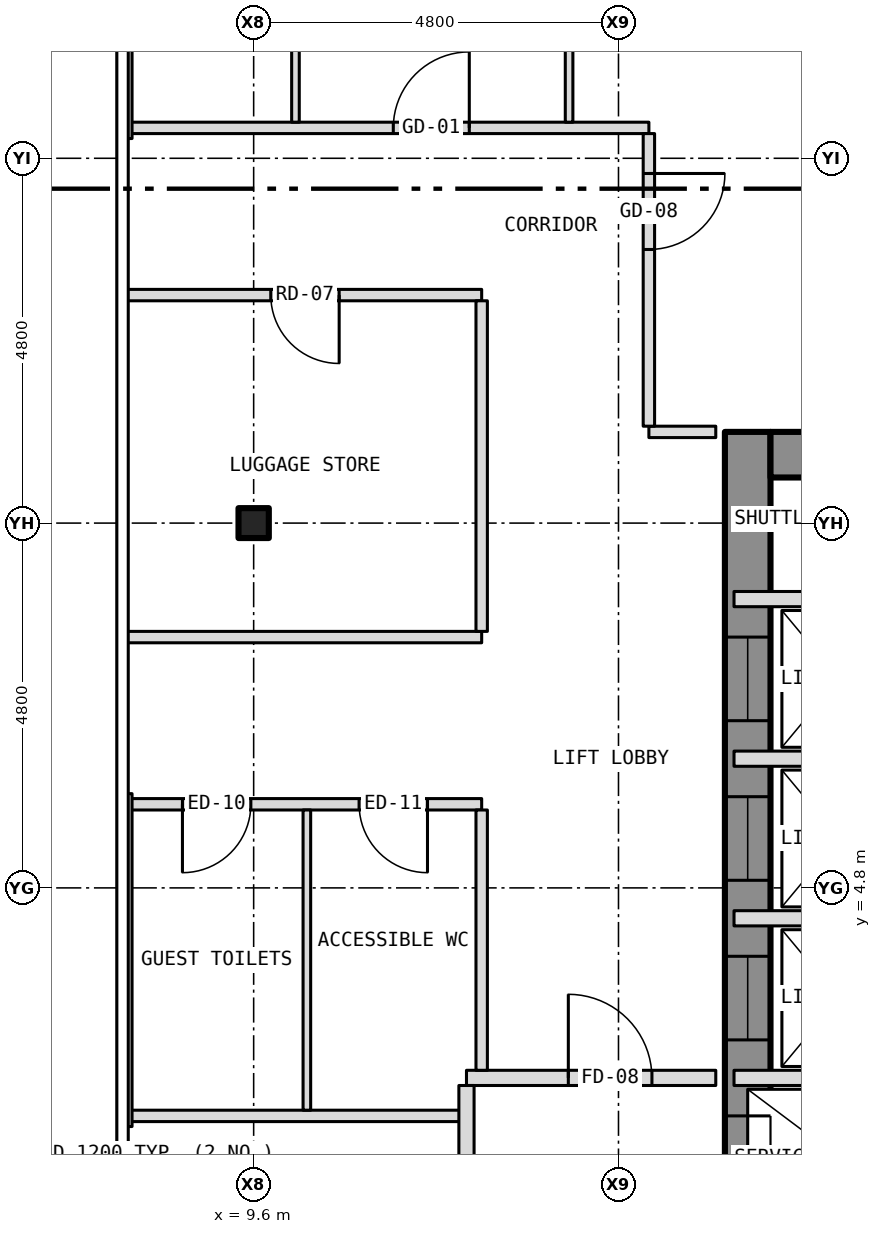
"""IFC4 building model, lengths in metres.
Left out: names, types, materials, properties, quantities, classifications, styles, units other than length and angle.
Written with IfcOpenShell. Run it as: python <this file> out.ifc"""

import sys

from ifc_helpers import new_model, si_unit, direction, frame, frame_2d, origin, origin_2d, place, context, subcontext, project, spatial, rectangle, i_section, extrude, element, fill, save


model = new_model("IFC4")
c1 = context("Model", 3, precision=1e-05, world=origin(), true_north=direction((0.0, 1.0)))
c2 = subcontext(c1, "Body", "Model", "MODEL_VIEW")
j1 = project(units=[si_unit("LENGTHUNIT", "METRE"), si_unit("PLANEANGLEUNIT", "RADIAN")], contexts=[c1])
p1 = place(None, origin())
s1 = spatial("IfcSite", under=j1, at=p1, CompositionType="ELEMENT")
p2 = place(p1, origin())
s2 = spatial("IfcBuilding", under=s1, at=p2, CompositionType="ELEMENT")
p3 = place(p2, frame((0.0, 0.0, 120.5)))
s3 = spatial("IfcBuildingStorey", under=s2, at=p3, CompositionType="ELEMENT", Elevation=120.5)
p4 = place(p3, frame((9.6, 9.6, -0.15), z_axis=(0.0, 0.0, 1.0), x_axis=(1.0, 0.0, 0.0)))
e1 = element("IfcColumn", 1, at=p4, inside=s3, PredefinedType="COLUMN", context=c2, shape_type="SweptSolid", body=[
    extrude(i_section(OverallWidth=0.399, OverallDepth=0.394, WebThickness=0.023, FlangeThickness=0.037, at=origin_2d()), origin(), (0.0, 0.0, 1.0), 3.5),
])
p5 = place(p3, frame((16.1, -10.8, 0.0), z_axis=(0.0, 0.0, 1.0), x_axis=(0.0, 1.0, 0.0)))
e2 = element("IfcWall", 2, at=p5, inside=s3, PredefinedType="SHEAR", context=c2, shape_type="SweptSolid", body=[
    extrude(rectangle(XDim=21.6, YDim=0.6, at=frame_2d((10.8, 0.0))), origin(), (0.0, 0.0, 1.0), 3.25),
])
p6 = place(p5, frame((9.4, 0.0, 0.0)))
e3 = element("IfcOpeningElement", 3, at=p6, cuts=e2, PredefinedType="OPENING", context=c2, shape_type="SweptSolid", body=[
    extrude(rectangle(XDim=1.1, YDim=2.1, at=frame_2d((0.55, 1.05))), frame((0.0, 0.312, 0.0), z_axis=(0.0, -1.0, 0.0), x_axis=(1.0, 0.0, 0.0)), (0.0, 0.0, 1.0), 0.624),
])
p7 = place(p5, frame((11.5, 0.0, 0.0)))
e4 = element("IfcOpeningElement", 4, at=p7, cuts=e2, PredefinedType="OPENING", context=c2, shape_type="SweptSolid", body=[
    extrude(rectangle(XDim=1.1, YDim=2.1, at=frame_2d((0.55, 1.05))), frame((0.0, 0.312, 0.0), z_axis=(0.0, -1.0, 0.0), x_axis=(1.0, 0.0, 0.0)), (0.0, 0.0, 1.0), 0.624),
])
p8 = place(p5, frame((13.6, 0.0, 0.0)))
e5 = element("IfcOpeningElement", 5, at=p8, cuts=e2, PredefinedType="OPENING", context=c2, shape_type="SweptSolid", body=[
    extrude(rectangle(XDim=1.1, YDim=2.1, at=frame_2d((0.55, 1.05))), frame((0.0, 0.312, 0.0), z_axis=(0.0, -1.0, 0.0), x_axis=(1.0, 0.0, 0.0)), (0.0, 0.0, 1.0), 0.624),
])
p9 = place(p5, frame((15.7, 0.0, 0.0)))
e6 = element("IfcOpeningElement", 6, at=p9, cuts=e2, PredefinedType="OPENING", context=c2, shape_type="SweptSolid", body=[
    extrude(rectangle(XDim=1.1, YDim=2.1, at=frame_2d((0.55, 1.05))), frame((0.0, 0.312, 0.0), z_axis=(0.0, -1.0, 0.0), x_axis=(1.0, 0.0, 0.0)), (0.0, 0.0, 1.0), 0.624),
])
p10 = place(p5, frame((17.8, 0.0, 0.0)))
e7 = element("IfcOpeningElement", 7, at=p10, cuts=e2, PredefinedType="OPENING", context=c2, shape_type="SweptSolid", body=[
    extrude(rectangle(XDim=1.1, YDim=2.1, at=frame_2d((0.55, 1.05))), frame((0.0, 0.312, 0.0), z_axis=(0.0, -1.0, 0.0), x_axis=(1.0, 0.0, 0.0)), (0.0, 0.0, 1.0), 0.624),
])
p11 = place(p5, frame((5.642, 0.0, 0.0)))
e8 = element("IfcOpeningElement", 8, at=p11, cuts=e2, PredefinedType="OPENING", context=c2, shape_type="SweptSolid", body=[
    extrude(rectangle(XDim=1.1, YDim=2.1, at=frame_2d((0.55, 1.05))), frame((0.0, 0.312, 0.0), z_axis=(0.0, -1.0, 0.0), x_axis=(1.0, 0.0, 0.0)), (0.0, 0.0, 1.0), 0.624),
])
p12 = place(p5, frame((7.5, 0.0, 0.0)))
e9 = element("IfcOpeningElement", 9, at=p12, cuts=e2, PredefinedType="OPENING", context=c2, shape_type="SweptSolid", body=[
    extrude(rectangle(XDim=1.1, YDim=2.1, at=frame_2d((0.55, 1.05))), frame((0.0, 0.312, 0.0), z_axis=(0.0, -1.0, 0.0), x_axis=(1.0, 0.0, 0.0)), (0.0, 0.0, 1.0), 0.624),
])
p13 = place(p3, frame((16.4, 10.5, 0.0), z_axis=(0.0, 0.0, 1.0), x_axis=(1.0, 0.0, 0.0)))
e10 = element("IfcWall", 10, at=p13, inside=s3, PredefinedType="SHEAR", context=c2, shape_type="SweptSolid", body=[
    extrude(rectangle(XDim=5.8, YDim=0.6, at=frame_2d((2.9, 0.0))), origin(), (0.0, 0.0, 1.0), 3.25),
])
p14 = place(p3, frame((7.875, -1.4, 0.0), z_axis=(0.0, 0.0, 1.0), x_axis=(0.0, 1.0, 0.0)))
e11 = element("IfcWall", 11, at=p14, inside=s3, PredefinedType="SOLIDWALL", context=c2, shape_type="SweptSolid", body=[
    extrude(rectangle(XDim=2.8, YDim=0.2, at=frame_2d((1.4, 0.0))), origin(), (0.0, 0.0, 1.0), 3.5),
])
p15 = place(p14, frame((0.5, 0.0, 0.0)))
e12 = element("IfcOpeningElement", 12, at=p15, cuts=e11, PredefinedType="OPENING", context=c2, shape_type="SweptSolid", body=[
    extrude(rectangle(XDim=1.8, YDim=2.1, at=frame_2d((0.9, 1.05))), frame((0.0, 0.112, 0.0), z_axis=(0.0, -1.0, 0.0), x_axis=(1.0, 0.0, 0.0)), (0.0, 0.0, 1.0), 0.224),
])
p16 = place(p3, frame((7.95, 1.8, 0.0), z_axis=(0.0, 0.0, 1.0), x_axis=(1.0, 0.0, 0.0)))
e13 = element("IfcWall", 13, at=p16, inside=s3, PredefinedType="PARTITIONING", context=c2, shape_type="SweptSolid", body=[
    extrude(rectangle(XDim=4.45, YDim=0.15, at=frame_2d((2.225, 0.0))), origin(), (0.0, 0.0, 1.0), 3.35),
])
p17 = place(p3, frame((12.4, 2.3, 0.0), z_axis=(0.0, 0.0, 1.0), x_axis=(1.0, 0.0, 0.0)))
e14 = element("IfcWall", 14, at=p17, inside=s3, PredefinedType="PARTITIONING", context=c2, shape_type="SweptSolid", body=[
    extrude(rectangle(XDim=3.28, YDim=0.2, at=frame_2d((1.64, 0.0))), origin(), (0.0, 0.0, 1.0), 3.35),
])
p18 = place(p17, frame((1.34, 0.0, 0.0)))
e15 = element("IfcOpeningElement", 15, at=p18, cuts=e14, PredefinedType="OPENING", context=c2, shape_type="SweptSolid", body=[
    extrude(rectangle(XDim=1.1, YDim=2.1, at=frame_2d((0.55, 1.05))), frame((0.0, 0.112, 0.0), z_axis=(0.0, -1.0, 0.0), x_axis=(1.0, 0.0, 0.0)), (0.0, 0.0, 1.0), 0.224),
])
for number, where, z_axis, x_axis in (
    (16, (15.92, 2.3, 0.0), (0.0, 0.0, 1.0), (1.0, 0.0, 0.0)),
    (17, (15.92, 4.4, 0.0), (0.0, 0.0, 1.0), (1.0, 0.0, 0.0)),
):
    element("IfcWall", number, at=place(p3, frame(where, z_axis=z_axis, x_axis=x_axis)), inside=s3, PredefinedType="PARTITIONING", context=c2, shape_type="SweptSolid", body=[
        extrude(rectangle(XDim=2.88, YDim=0.2, at=frame_2d((1.44, 0.0))), origin(), (0.0, 0.0, 1.0), 3.25),
    ])
p19 = place(p3, frame((7.95, 5.9, 0.0), z_axis=(0.0, 0.0, 1.0), x_axis=(1.0, 0.0, 0.0)))
e18 = element("IfcWall", 18, at=p19, inside=s3, PredefinedType="PARTITIONING", context=c2, shape_type="SweptSolid", body=[
    extrude(rectangle(XDim=4.65, YDim=0.15, at=frame_2d((2.325, 0.0))), origin(), (0.0, 0.0, 1.0), 3.35),
])
p20 = place(p19, frame((0.713, 0.0, 0.0)))
e19 = element("IfcOpeningElement", 19, at=p20, cuts=e18, PredefinedType="OPENING", context=c2, shape_type="SweptSolid", body=[
    extrude(rectangle(XDim=0.9, YDim=2.1, at=frame_2d((0.45, 1.05))), frame((0.0, 0.087, 0.0), z_axis=(0.0, -1.0, 0.0), x_axis=(1.0, 0.0, 0.0)), (0.0, 0.0, 1.0), 0.174),
])
p21 = place(p19, frame((3.037, 0.0, 0.0)))
e20 = element("IfcOpeningElement", 20, at=p21, cuts=e18, PredefinedType="OPENING", context=c2, shape_type="SweptSolid", body=[
    extrude(rectangle(XDim=0.9, YDim=2.1, at=frame_2d((0.45, 1.05))), frame((0.0, 0.087, 0.0), z_axis=(0.0, -1.0, 0.0), x_axis=(1.0, 0.0, 0.0)), (0.0, 0.0, 1.0), 0.174),
])
p22 = place(p3, frame((15.92, 6.5, 0.0), z_axis=(0.0, 0.0, 1.0), x_axis=(1.0, 0.0, 0.0)))
e21 = element("IfcWall", 21, at=p22, inside=s3, PredefinedType="PARTITIONING", context=c2, shape_type="SweptSolid", body=[
    extrude(rectangle(XDim=2.88, YDim=0.2, at=frame_2d((1.44, 0.0))), origin(), (0.0, 0.0, 1.0), 3.25),
])
p23 = place(p3, frame((7.92, 8.1, 0.0), z_axis=(0.0, 0.0, 1.0), x_axis=(1.0, 0.0, 0.0)))
e22 = element("IfcWall", 22, at=p23, inside=s3, PredefinedType="PARTITIONING", context=c2, shape_type="SweptSolid", body=[
    extrude(rectangle(XDim=4.68, YDim=0.15, at=frame_2d((2.34, 0.0))), origin(), (0.0, 0.0, 1.0), 3.35),
])
p24 = place(p3, frame((15.92, 8.6, 0.0), z_axis=(0.0, 0.0, 1.0), x_axis=(1.0, 0.0, 0.0)))
e23 = element("IfcWall", 23, at=p24, inside=s3, PredefinedType="PARTITIONING", context=c2, shape_type="SweptSolid", body=[
    extrude(rectangle(XDim=2.88, YDim=0.2, at=frame_2d((1.44, 0.0))), origin(), (0.0, 0.0, 1.0), 3.25),
])
p25 = place(p3, frame((14.8, 10.8, 0.0), z_axis=(0.0, 0.0, 1.0), x_axis=(1.0, 0.0, 0.0)))
e24 = element("IfcWall", 24, at=p25, inside=s3, PredefinedType="PARTITIONING", context=c2, shape_type="SweptSolid", body=[
    extrude(rectangle(XDim=0.88, YDim=0.15, at=frame_2d((0.44, 0.0))), origin(), (0.0, 0.0, 1.0), 3.35),
])
p26 = place(p3, frame((7.92, 12.6, 0.0), z_axis=(0.0, 0.0, 1.0), x_axis=(1.0, 0.0, 0.0)))
e25 = element("IfcWall", 25, at=p26, inside=s3, PredefinedType="PARTITIONING", context=c2, shape_type="SweptSolid", body=[
    extrude(rectangle(XDim=4.68, YDim=0.15, at=frame_2d((2.34, 0.0))), origin(), (0.0, 0.0, 1.0), 3.35),
])
p27 = place(p26, frame((1.905, 0.0, 0.0)))
e26 = element("IfcOpeningElement", 26, at=p27, cuts=e25, PredefinedType="OPENING", context=c2, shape_type="SweptSolid", body=[
    extrude(rectangle(XDim=0.9, YDim=2.1, at=frame_2d((0.45, 1.05))), frame((0.0, 0.087, 0.0), z_axis=(0.0, -1.0, 0.0), x_axis=(1.0, 0.0, 0.0)), (0.0, 0.0, 1.0), 0.174),
])
p28 = place(p3, frame((7.95, 14.8, 0.0), z_axis=(0.0, 0.0, 1.0), x_axis=(1.0, 0.0, 0.0)))
e27 = element("IfcWall", 27, at=p28, inside=s3, PredefinedType="PARTITIONING", context=c2, shape_type="SweptSolid", body=[
    extrude(rectangle(XDim=6.85, YDim=0.15, at=frame_2d((3.425, 0.0))), origin(), (0.0, 0.0, 1.0), 3.35),
])
p29 = place(p28, frame((3.487, 0.0, 0.0)))
e28 = element("IfcOpeningElement", 28, at=p29, cuts=e27, PredefinedType="OPENING", context=c2, shape_type="SweptSolid", body=[
    extrude(rectangle(XDim=1.0, YDim=2.1, at=frame_2d((0.5, 1.05))), frame((0.0, 0.087, 0.0), z_axis=(0.0, -1.0, 0.0), x_axis=(1.0, 0.0, 0.0)), (0.0, 0.0, 1.0), 0.174),
])
p30 = place(p3, frame((7.95, 1.66, 0.0), z_axis=(0.0, 0.0, 1.0), x_axis=(0.0, 1.0, 0.0)))
e29 = element("IfcWall", 29, at=p30, inside=s3, PredefinedType="PARTITIONING", context=c2, shape_type="SweptSolid", body=[
    extrude(rectangle(XDim=4.38, YDim=0.1, at=frame_2d((2.19, 0.0))), origin(), (0.0, 0.0, 1.0), 2.733),
])
p31 = place(p3, frame((7.95, 14.66, 0.0), z_axis=(0.0, 0.0, 1.0), x_axis=(0.0, 1.0, 0.0)))
e30 = element("IfcWall", 30, at=p31, inside=s3, PredefinedType="PARTITIONING", context=c2, shape_type="SweptSolid", body=[
    extrude(rectangle(XDim=3.48, YDim=0.1, at=frame_2d((1.74, 0.0))), origin(), (0.0, 0.0, 1.0), 2.733),
])
p32 = place(p3, frame((10.15, 14.875, 0.0), z_axis=(0.0, 0.0, 1.0), x_axis=(0.0, 1.0, 0.0)))
e31 = element("IfcWall", 31, at=p32, inside=s3, PredefinedType="PARTITIONING", context=c2, shape_type="SweptSolid", body=[
    extrude(rectangle(XDim=3.075, YDim=0.1, at=frame_2d((1.538, 0.0))), origin(), (0.0, 0.0, 1.0), 3.35),
])
p33 = place(p32, frame((1.971, 0.0, 0.0)))
e32 = element("IfcOpeningElement", 32, at=p33, cuts=e31, PredefinedType="OPENING", context=c2, shape_type="SweptSolid", body=[
    extrude(rectangle(XDim=0.9, YDim=2.1, at=frame_2d((0.45, 1.05))), frame((0.0, 0.062, 0.0), z_axis=(0.0, -1.0, 0.0), x_axis=(1.0, 0.0, 0.0)), (0.0, 0.0, 1.0), 0.124),
])
p34 = place(p3, frame((10.3, 1.875, 0.0), z_axis=(0.0, 0.0, 1.0), x_axis=(0.0, 1.0, 0.0)))
e33 = element("IfcWall", 33, at=p34, inside=s3, PredefinedType="PARTITIONING", context=c2, shape_type="SweptSolid", body=[
    extrude(rectangle(XDim=3.95, YDim=0.1, at=frame_2d((1.975, 0.0))), origin(), (0.0, 0.0, 1.0), 3.35),
])
p35 = place(p3, frame((12.4, -1.8, 0.0), z_axis=(0.0, 0.0, 1.0), x_axis=(0.0, 1.0, 0.0)))
e34 = element("IfcWall", 34, at=p35, inside=s3, PredefinedType="PARTITIONING", context=c2, shape_type="SweptSolid", body=[
    extrude(rectangle(XDim=4.0, YDim=0.2, at=frame_2d((2.0, 0.0))), origin(), (0.0, 0.0, 1.0), 3.35),
])
p36 = place(p35, frame((1.25, 0.0, 0.0)))
e35 = element("IfcOpeningElement", 35, at=p36, cuts=e34, PredefinedType="OPENING", context=c2, shape_type="SweptSolid", body=[
    extrude(rectangle(XDim=1.1, YDim=2.1, at=frame_2d((0.55, 1.05))), frame((0.0, 0.112, 0.0), z_axis=(0.0, -1.0, 0.0), x_axis=(1.0, 0.0, 0.0)), (0.0, 0.0, 1.0), 0.224),
])
p37 = place(p3, frame((12.6, 2.4, 0.0), z_axis=(0.0, 0.0, 1.0), x_axis=(0.0, 1.0, 0.0)))
e36 = element("IfcWall", 36, at=p37, inside=s3, PredefinedType="PARTITIONING", context=c2, shape_type="SweptSolid", body=[
    extrude(rectangle(XDim=3.425, YDim=0.15, at=frame_2d((1.712, 0.0))), origin(), (0.0, 0.0, 1.0), 3.35),
])
p38 = place(p3, frame((12.6, 8.175, 0.0), z_axis=(0.0, 0.0, 1.0), x_axis=(0.0, 1.0, 0.0)))
e37 = element("IfcWall", 37, at=p38, inside=s3, PredefinedType="PARTITIONING", context=c2, shape_type="SweptSolid", body=[
    extrude(rectangle(XDim=4.35, YDim=0.15, at=frame_2d((2.175, 0.0))), origin(), (0.0, 0.0, 1.0), 3.35),
])
p39 = place(p3, frame((13.75, 14.875, 0.0), z_axis=(0.0, 0.0, 1.0), x_axis=(0.0, 1.0, 0.0)))
e38 = element("IfcWall", 38, at=p39, inside=s3, PredefinedType="PARTITIONING", context=c2, shape_type="SweptSolid", body=[
    extrude(rectangle(XDim=7.805, YDim=0.1, at=frame_2d((3.902, 0.0))), origin(), (0.0, 0.0, 1.0), 3.35),
])
p40 = place(p3, frame((14.8, 10.875, 0.0), z_axis=(0.0, 0.0, 1.0), x_axis=(0.0, 1.0, 0.0)))
e39 = element("IfcWall", 39, at=p40, inside=s3, PredefinedType="PARTITIONING", context=c2, shape_type="SweptSolid", body=[
    extrude(rectangle(XDim=3.85, YDim=0.15, at=frame_2d((1.925, 0.0))), origin(), (0.0, 0.0, 1.0), 3.35),
])
p41 = place(p40, frame((2.325, 0.0, 0.0)))
e40 = element("IfcOpeningElement", 40, at=p41, cuts=e39, PredefinedType="OPENING", context=c2, shape_type="SweptSolid", body=[
    extrude(rectangle(XDim=1.0, YDim=2.1, at=frame_2d((0.5, 1.05))), frame((0.0, 0.087, 0.0), z_axis=(0.0, -1.0, 0.0), x_axis=(1.0, 0.0, 0.0)), (0.0, 0.0, 1.0), 0.174),
])
p42 = place(p7, origin())
e41 = element("IfcDoor", 41, at=p42, inside=s3, OperationType="SLIDING_TO_LEFT", PredefinedType="DOOR", context=c2, shape_type="SweptSolid", body=[
    extrude(rectangle(XDim=1.1, YDim=2.1, at=frame_2d((0.55, 1.05))), frame((0.0, 0.025, 0.0), z_axis=(0.0, -1.0, 0.0), x_axis=(1.0, 0.0, 0.0)), (0.0, 0.0, 1.0), 0.05),
])
fill(e4, e41)
p43 = place(p8, origin())
e42 = element("IfcDoor", 42, at=p43, inside=s3, OperationType="SLIDING_TO_LEFT", PredefinedType="DOOR", context=c2, shape_type="SweptSolid", body=[
    extrude(rectangle(XDim=1.1, YDim=2.1, at=frame_2d((0.55, 1.05))), frame((0.0, 0.025, 0.0), z_axis=(0.0, -1.0, 0.0), x_axis=(1.0, 0.0, 0.0)), (0.0, 0.0, 1.0), 0.05),
])
fill(e5, e42)
p44 = place(p9, origin())
e43 = element("IfcDoor", 43, at=p44, inside=s3, OperationType="SLIDING_TO_LEFT", PredefinedType="DOOR", context=c2, shape_type="SweptSolid", body=[
    extrude(rectangle(XDim=1.1, YDim=2.1, at=frame_2d((0.55, 1.05))), frame((0.0, 0.025, 0.0), z_axis=(0.0, -1.0, 0.0), x_axis=(1.0, 0.0, 0.0)), (0.0, 0.0, 1.0), 0.05),
])
fill(e6, e43)
p45 = place(p10, origin())
e44 = element("IfcDoor", 44, at=p45, inside=s3, OperationType="SLIDING_TO_LEFT", PredefinedType="DOOR", context=c2, shape_type="SweptSolid", body=[
    extrude(rectangle(XDim=1.1, YDim=2.1, at=frame_2d((0.55, 1.05))), frame((0.0, 0.025, 0.0), z_axis=(0.0, -1.0, 0.0), x_axis=(1.0, 0.0, 0.0)), (0.0, 0.0, 1.0), 0.05),
])
fill(e7, e44)
p46 = place(p18, origin())
e45 = element("IfcDoor", 45, at=p46, inside=s3, OperationType="SINGLE_SWING_LEFT", PredefinedType="DOOR", context=c2, shape_type="SweptSolid", body=[
    extrude(rectangle(XDim=1.1, YDim=2.1, at=frame_2d((0.55, 1.05))), frame((0.0, 0.025, 0.0), z_axis=(0.0, -1.0, 0.0), x_axis=(1.0, 0.0, 0.0)), (0.0, 0.0, 1.0), 0.05),
])
fill(e15, e45)
p47 = place(p29, origin())
e46 = element("IfcDoor", 46, at=p47, inside=s3, OperationType="SINGLE_SWING_RIGHT", PredefinedType="DOOR", context=c2, shape_type="SweptSolid", body=[
    extrude(rectangle(XDim=1.0, YDim=2.1, at=frame_2d((0.5, 1.05))), frame((0.0, 0.025, 0.0), z_axis=(0.0, -1.0, 0.0), x_axis=(1.0, 0.0, 0.0)), (0.0, 0.0, 1.0), 0.05),
])
fill(e28, e46)
p48 = place(p41, origin())
e47 = element("IfcDoor", 47, at=p48, inside=s3, OperationType="SINGLE_SWING_RIGHT", PredefinedType="DOOR", context=c2, shape_type="SweptSolid", body=[
    extrude(rectangle(XDim=1.0, YDim=2.1, at=frame_2d((0.5, 1.05))), frame((0.0, 0.025, 0.0), z_axis=(0.0, -1.0, 0.0), x_axis=(1.0, 0.0, 0.0)), (0.0, 0.0, 1.0), 0.05),
])
fill(e40, e47)
p49 = place(p20, origin())
e48 = element("IfcDoor", 48, at=p49, inside=s3, OperationType="SINGLE_SWING_LEFT", PredefinedType="DOOR", context=c2, shape_type="SweptSolid", body=[
    extrude(rectangle(XDim=0.9, YDim=2.1, at=frame_2d((0.45, 1.05))), frame((0.0, 0.025, 0.0), z_axis=(0.0, -1.0, 0.0), x_axis=(1.0, 0.0, 0.0)), (0.0, 0.0, 1.0), 0.05),
])
fill(e19, e48)
p50 = place(p21, origin())
e49 = element("IfcDoor", 49, at=p50, inside=s3, OperationType="SINGLE_SWING_RIGHT", PredefinedType="DOOR", context=c2, shape_type="SweptSolid", body=[
    extrude(rectangle(XDim=0.9, YDim=2.1, at=frame_2d((0.45, 1.05))), frame((0.0, 0.025, 0.0), z_axis=(0.0, -1.0, 0.0), x_axis=(1.0, 0.0, 0.0)), (0.0, 0.0, 1.0), 0.05),
])
fill(e20, e49)
p51 = place(p27, origin())
e50 = element("IfcDoor", 50, at=p51, inside=s3, OperationType="SINGLE_SWING_RIGHT", PredefinedType="DOOR", context=c2, shape_type="SweptSolid", body=[
    extrude(rectangle(XDim=0.9, YDim=2.1, at=frame_2d((0.45, 1.05))), frame((0.0, 0.025, 0.0), z_axis=(0.0, -1.0, 0.0), x_axis=(1.0, 0.0, 0.0)), (0.0, 0.0, 1.0), 0.05),
])
fill(e26, e50)
save(model, sys.argv[1])
